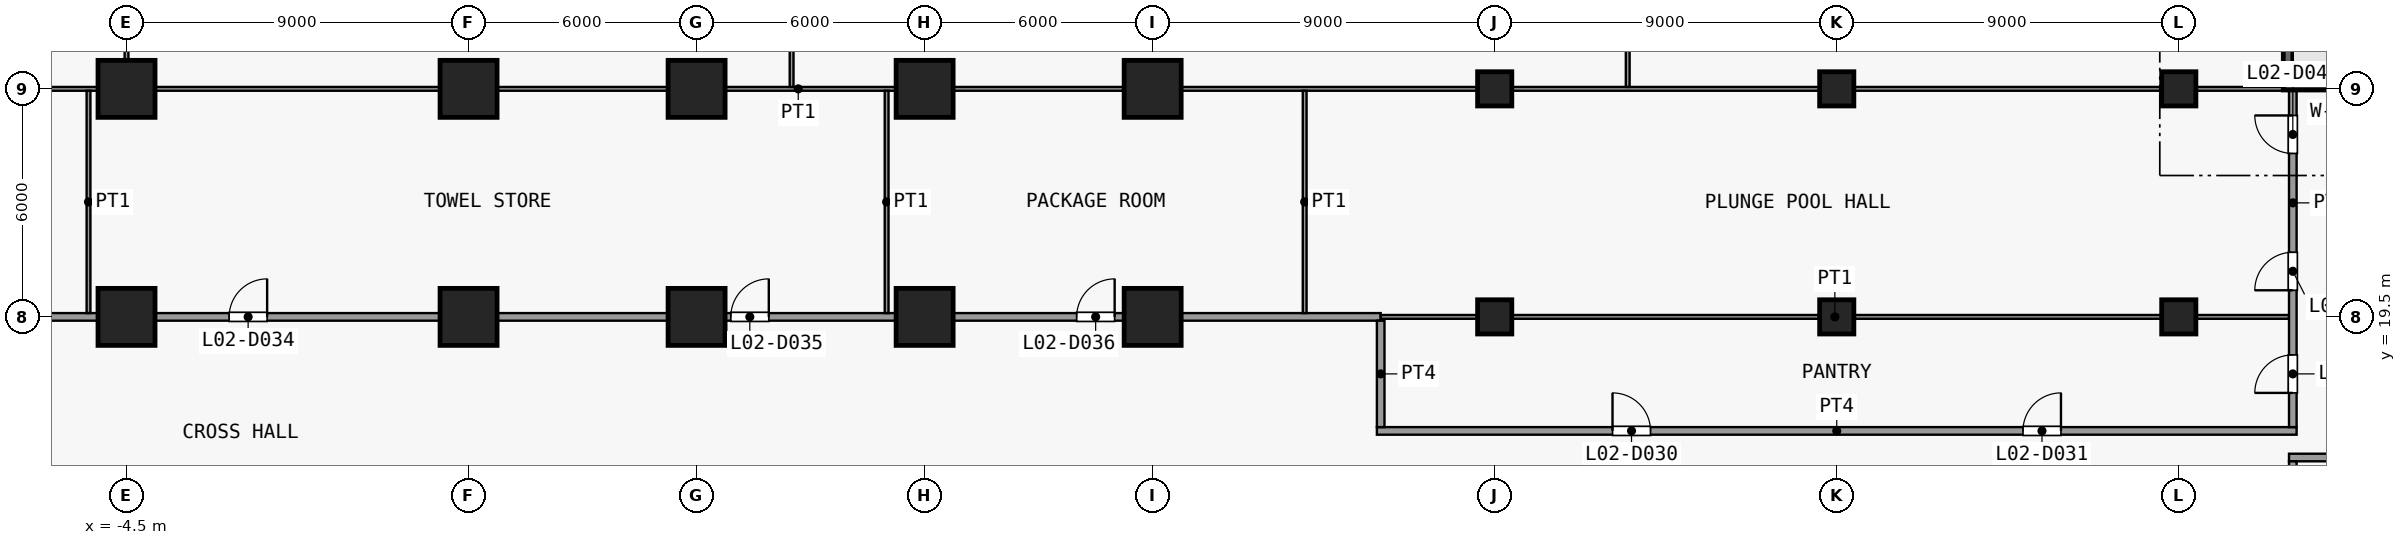
"""IFC4 building model, lengths in metres.
Left out: names, types, materials, properties, quantities, classifications, styles, units other than length and angle.
Written with IfcOpenShell. Run it as: python <this file> out.ifc"""

import sys

from ifc_helpers import new_model, si_unit, direction, frame, frame_2d, origin, origin_2d, place, context, subcontext, project, spatial, rectangle, extrude, element, fill, save


model = new_model("IFC4")
c1 = context("Model", 3, precision=1e-05, world=origin(), true_north=direction((0.0, 1.0)))
c2 = subcontext(c1, "Body", "Model", "MODEL_VIEW")
j1 = project(units=[si_unit("LENGTHUNIT", "METRE"), si_unit("PLANEANGLEUNIT", "RADIAN")], contexts=[c1])
p1 = place(None, origin())
s1 = spatial("IfcSite", under=j1, at=p1, CompositionType="ELEMENT")
p2 = place(p1, origin())
s2 = spatial("IfcBuilding", under=s1, at=p2, CompositionType="ELEMENT")
p3 = place(p2, frame((0.0, 0.0, 13.5)))
s3 = spatial("IfcBuildingStorey", under=s2, at=p3, CompositionType="ELEMENT", Elevation=13.5)
for number, where, z_axis, x_axis in (
    (1, (-4.5, 19.5, 0.0), (0.0, 0.0, 1.0), (1.0, 0.0, 0.0)),
    (2, (-4.5, 25.5, 0.0), (0.0, 0.0, 1.0), (1.0, 0.0, 0.0)),
    (3, (4.5, 19.5, 0.0), (0.0, 0.0, 1.0), (1.0, 0.0, 0.0)),
    (4, (4.5, 25.5, 0.0), (0.0, 0.0, 1.0), (1.0, 0.0, 0.0)),
    (5, (10.5, 19.5, 0.0), (0.0, 0.0, 1.0), (1.0, 0.0, 0.0)),
    (6, (10.5, 25.5, 0.0), (0.0, 0.0, 1.0), (1.0, 0.0, 0.0)),
    (7, (16.5, 19.5, 0.0), (0.0, 0.0, 1.0), (1.0, 0.0, 0.0)),
    (8, (16.5, 25.5, 0.0), (0.0, 0.0, 1.0), (1.0, 0.0, 0.0)),
    (9, (22.5, 19.5, 0.0), (0.0, 0.0, 1.0), (1.0, 0.0, 0.0)),
    (10, (22.5, 25.5, 0.0), (0.0, 0.0, 1.0), (1.0, 0.0, 0.0)),
):
    element("IfcColumn", number, at=place(p3, frame(where, z_axis=z_axis, x_axis=x_axis)), inside=s3, PredefinedType="COLUMN", context=c2, shape_type="SweptSolid", body=[
        extrude(rectangle(XDim=1.5, YDim=1.5, at=origin_2d()), origin(), (0.0, 0.0, 1.0), 5.0),
    ])
for number, where, z_axis, x_axis in (
    (11, (31.5, 19.5, 0.0), (0.0, 0.0, 1.0), (1.0, 0.0, 0.0)),
    (12, (31.5, 25.5, 0.0), (0.0, 0.0, 1.0), (1.0, 0.0, 0.0)),
    (13, (40.5, 19.5, 0.0), (0.0, 0.0, 1.0), (1.0, 0.0, 0.0)),
    (14, (40.5, 25.5, 0.0), (0.0, 0.0, 1.0), (1.0, 0.0, 0.0)),
    (15, (49.5, 19.5, 0.0), (0.0, 0.0, 1.0), (1.0, 0.0, 0.0)),
    (16, (49.5, 25.5, 0.0), (0.0, 0.0, 1.0), (1.0, 0.0, 0.0)),
):
    element("IfcColumn", number, at=place(p3, frame(where, z_axis=z_axis, x_axis=x_axis)), inside=s3, PredefinedType="COLUMN", context=c2, shape_type="SweptSolid", body=[
        extrude(rectangle(XDim=0.9, YDim=0.9, at=origin_2d()), origin(), (0.0, 0.0, 1.0), 5.0),
    ])
p4 = place(p3, frame((52.375, 25.72, 0.0), z_axis=(0.0, 0.0, 1.0), x_axis=(0.0, 1.0, 0.0)))
e17 = element("IfcWall", 17, at=p4, inside=s3, PredefinedType="SHEAR", context=c2, shape_type="SweptSolid", body=[
    extrude(rectangle(XDim=1.35, YDim=0.25, at=frame_2d((0.675, 0.0))), origin(), (0.0, 0.0, 1.0), 4.65),
])
p5 = place(p3, frame((52.25, 25.595, 0.0), z_axis=(0.0, 0.0, 1.0), x_axis=(1.0, 0.0, 0.0)))
e18 = element("IfcWall", 18, at=p5, inside=s3, PredefinedType="SHEAR", context=c2, shape_type="SweptSolid", body=[
    extrude(rectangle(XDim=3.35, YDim=0.25, at=frame_2d((1.675, 0.0))), origin(), (0.0, 0.0, 1.0), 4.65),
])
p6 = place(p3, frame((52.4, 15.8, 0.0), z_axis=(0.0, 0.0, 1.0), x_axis=(1.0, 0.0, 0.0)))
e19 = element("IfcWall", 19, at=p6, inside=s3, PredefinedType="PARTITIONING", context=c2, shape_type="SweptSolid", body=[
    extrude(rectangle(XDim=6.2, YDim=0.2, at=frame_2d((3.1, 0.0))), origin(), (0.0, 0.0, 1.0), 4.65),
])
p7 = place(p3, frame((28.4, 16.5, 0.0), z_axis=(0.0, 0.0, 1.0), x_axis=(1.0, 0.0, 0.0)))
e20 = element("IfcWall", 20, at=p7, inside=s3, PredefinedType="PARTITIONING", context=c2, shape_type="SweptSolid", body=[
    extrude(rectangle(XDim=24.2, YDim=0.2, at=frame_2d((12.1, 0.0))), origin(), (0.0, 0.0, 1.0), 4.65),
])
p8 = place(p7, frame((6.2, 0.0, 0.0)))
e21 = element("IfcOpeningElement", 21, at=p8, cuts=e20, PredefinedType="OPENING", context=c2, shape_type="SweptSolid", body=[
    extrude(rectangle(XDim=1.0, YDim=2.1, at=frame_2d((0.5, 1.05))), frame((0.0, 0.11, 0.0), z_axis=(0.0, -1.0, 0.0), x_axis=(1.0, 0.0, 0.0)), (0.0, 0.0, 1.0), 0.22),
])
p9 = place(p7, frame((17.0, 0.0, 0.0)))
e22 = element("IfcOpeningElement", 22, at=p9, cuts=e20, PredefinedType="OPENING", context=c2, shape_type="SweptSolid", body=[
    extrude(rectangle(XDim=1.0, YDim=2.1, at=frame_2d((0.5, 1.05))), frame((0.0, 0.11, 0.0), z_axis=(0.0, -1.0, 0.0), x_axis=(1.0, 0.0, 0.0)), (0.0, 0.0, 1.0), 0.22),
])
p10 = place(p3, frame((-31.6, 19.5, 0.0), z_axis=(0.0, 0.0, 1.0), x_axis=(1.0, 0.0, 0.0)))
e23 = element("IfcWall", 23, at=p10, inside=s3, PredefinedType="PARTITIONING", context=c2, shape_type="SweptSolid", body=[
    extrude(rectangle(XDim=60.1, YDim=0.2, at=frame_2d((30.05, 0.0))), origin(), (0.0, 0.0, 1.0), 4.65),
])
p11 = place(p10, frame((4.8, 0.0, 0.0)))
e24 = element("IfcOpeningElement", 24, at=p11, cuts=e23, PredefinedType="OPENING", context=c2, shape_type="SweptSolid", body=[
    extrude(rectangle(XDim=1.0, YDim=2.1, at=frame_2d((0.5, 1.05))), frame((0.0, 0.11, 0.0), z_axis=(0.0, -1.0, 0.0), x_axis=(1.0, 0.0, 0.0)), (0.0, 0.0, 1.0), 0.22),
])
p12 = place(p10, frame((19.2, 0.0, 0.0)))
e25 = element("IfcOpeningElement", 25, at=p12, cuts=e23, PredefinedType="OPENING", context=c2, shape_type="SweptSolid", body=[
    extrude(rectangle(XDim=1.0, YDim=2.1, at=frame_2d((0.5, 1.05))), frame((0.0, 0.11, 0.0), z_axis=(0.0, -1.0, 0.0), x_axis=(1.0, 0.0, 0.0)), (0.0, 0.0, 1.0), 0.22),
])
p13 = place(p10, frame((29.8, 0.0, 0.0)))
e26 = element("IfcOpeningElement", 26, at=p13, cuts=e23, PredefinedType="OPENING", context=c2, shape_type="SweptSolid", body=[
    extrude(rectangle(XDim=1.0, YDim=2.1, at=frame_2d((0.5, 1.05))), frame((0.0, 0.11, 0.0), z_axis=(0.0, -1.0, 0.0), x_axis=(1.0, 0.0, 0.0)), (0.0, 0.0, 1.0), 0.22),
])
p14 = place(p10, frame((43.0, 0.0, 0.0)))
e27 = element("IfcOpeningElement", 27, at=p14, cuts=e23, PredefinedType="OPENING", context=c2, shape_type="SweptSolid", body=[
    extrude(rectangle(XDim=1.0, YDim=2.1, at=frame_2d((0.5, 1.05))), frame((0.0, 0.11, 0.0), z_axis=(0.0, -1.0, 0.0), x_axis=(1.0, 0.0, 0.0)), (0.0, 0.0, 1.0), 0.22),
])
p15 = place(p10, frame((52.1, 0.0, 0.0)))
e28 = element("IfcOpeningElement", 28, at=p15, cuts=e23, PredefinedType="OPENING", context=c2, shape_type="SweptSolid", body=[
    extrude(rectangle(XDim=1.0, YDim=2.1, at=frame_2d((0.5, 1.05))), frame((0.0, 0.11, 0.0), z_axis=(0.0, -1.0, 0.0), x_axis=(1.0, 0.0, 0.0)), (0.0, 0.0, 1.0), 0.22),
])
p16 = place(p3, frame((28.5, 19.5, 0.0), z_axis=(0.0, 0.0, 1.0), x_axis=(1.0, 0.0, 0.0)))
e29 = element("IfcWall", 29, at=p16, inside=s3, PredefinedType="PARTITIONING", context=c2, shape_type="SweptSolid", body=[
    extrude(rectangle(XDim=23.9, YDim=0.1, at=frame_2d((11.95, 0.0))), origin(), (0.0, 0.0, 1.0), 4.65),
])
p17 = place(p3, frame((-25.9, 25.5, 0.0), z_axis=(0.0, 0.0, 1.0), x_axis=(1.0, 0.0, 0.0)))
e30 = element("IfcWall", 30, at=p17, inside=s3, PredefinedType="PARTITIONING", context=c2, shape_type="SweptSolid", body=[
    extrude(rectangle(XDim=78.15, YDim=0.1, at=frame_2d((39.075, 0.0))), origin(), (0.0, 0.0, 1.0), 4.65),
])
for number, where, z_axis, x_axis in (
    (31, (-5.5, 19.6, 0.0), (0.0, 0.0, 1.0), (0.0, 1.0, 0.0)),
    (32, (-4.5, 25.55, 0.0), (0.0, 0.0, 1.0), (0.0, 1.0, 0.0)),
    (33, (13.0, 25.55, 0.0), (0.0, 0.0, 1.0), (0.0, 1.0, 0.0)),
    (34, (15.5, 19.6, 0.0), (0.0, 0.0, 1.0), (0.0, 1.0, 0.0)),
    (35, (26.5, 19.6, 0.0), (0.0, 0.0, 1.0), (0.0, 1.0, 0.0)),
):
    element("IfcWall", number, at=place(p3, frame(where, z_axis=z_axis, x_axis=x_axis)), inside=s3, PredefinedType="PARTITIONING", context=c2, shape_type="SweptSolid", body=[
        extrude(rectangle(XDim=5.85, YDim=0.1, at=frame_2d((2.925, 0.0))), origin(), (0.0, 0.0, 1.0), 4.65),
    ])
p18 = place(p3, frame((28.5, 16.6, 0.0), z_axis=(0.0, 0.0, 1.0), x_axis=(0.0, 1.0, 0.0)))
e36 = element("IfcWall", 36, at=p18, inside=s3, PredefinedType="PARTITIONING", context=c2, shape_type="SweptSolid", body=[
    extrude(rectangle(XDim=2.8, YDim=0.2, at=frame_2d((1.4, 0.0))), origin(), (0.0, 0.0, 1.0), 4.65),
])
p19 = place(p3, frame((35.0, 25.55, 0.0), z_axis=(0.0, 0.0, 1.0), x_axis=(0.0, 1.0, 0.0)))
e37 = element("IfcWall", 37, at=p19, inside=s3, PredefinedType="PARTITIONING", context=c2, shape_type="SweptSolid", body=[
    extrude(rectangle(XDim=5.85, YDim=0.1, at=frame_2d((2.925, 0.0))), origin(), (0.0, 0.0, 1.0), 4.65),
])
p20 = place(p3, frame((52.5, -16.5, 0.0), z_axis=(0.0, 0.0, 1.0), x_axis=(0.0, 1.0, 0.0)))
e38 = element("IfcWall", 38, at=p20, inside=s3, PredefinedType="PARTITIONING", context=c2, shape_type="SweptSolid", body=[
    extrude(rectangle(XDim=32.2, YDim=0.2, at=frame_2d((16.1, 0.0))), origin(), (0.0, 0.0, 1.0), 4.65),
])
p21 = place(p3, frame((52.5, 16.6, 0.0), z_axis=(0.0, 0.0, 1.0), x_axis=(0.0, 1.0, 0.0)))
e39 = element("IfcWall", 39, at=p21, inside=s3, PredefinedType="PARTITIONING", context=c2, shape_type="SweptSolid", body=[
    extrude(rectangle(XDim=8.87, YDim=0.2, at=frame_2d((4.435, 0.0))), origin(), (0.0, 0.0, 1.0), 4.65),
])
p22 = place(p21, frame((0.9, 0.0, 0.0)))
e40 = element("IfcOpeningElement", 40, at=p22, cuts=e39, PredefinedType="OPENING", context=c2, shape_type="SweptSolid", body=[
    extrude(rectangle(XDim=1.0, YDim=2.1, at=frame_2d((0.5, 1.05))), frame((0.0, 0.11, 0.0), z_axis=(0.0, -1.0, 0.0), x_axis=(1.0, 0.0, 0.0)), (0.0, 0.0, 1.0), 0.22),
])
p23 = place(p21, frame((3.6, 0.0, 0.0)))
e41 = element("IfcOpeningElement", 41, at=p23, cuts=e39, PredefinedType="OPENING", context=c2, shape_type="SweptSolid", body=[
    extrude(rectangle(XDim=1.0, YDim=2.1, at=frame_2d((0.5, 1.05))), frame((0.0, 0.11, 0.0), z_axis=(0.0, -1.0, 0.0), x_axis=(1.0, 0.0, 0.0)), (0.0, 0.0, 1.0), 0.22),
])
p24 = place(p21, frame((7.2, 0.0, 0.0)))
e42 = element("IfcOpeningElement", 42, at=p24, cuts=e39, PredefinedType="OPENING", context=c2, shape_type="SweptSolid", body=[
    extrude(rectangle(XDim=1.0, YDim=2.1, at=frame_2d((0.5, 1.05))), frame((0.0, 0.11, 0.0), z_axis=(0.0, -1.0, 0.0), x_axis=(1.0, 0.0, 0.0)), (0.0, 0.0, 1.0), 0.22),
])
p25 = place(p8, origin())
e43 = element("IfcDoor", 43, at=p25, inside=s3, OperationType="SINGLE_SWING_RIGHT", PredefinedType="DOOR", context=c2, shape_type="SweptSolid", body=[
    extrude(rectangle(XDim=1.0, YDim=2.1, at=frame_2d((0.5, 1.05))), frame((0.0, 0.025, 0.0), z_axis=(0.0, -1.0, 0.0), x_axis=(1.0, 0.0, 0.0)), (0.0, 0.0, 1.0), 0.05),
])
fill(e21, e43)
p26 = place(p9, origin())
e44 = element("IfcDoor", 44, at=p26, inside=s3, OperationType="SINGLE_SWING_LEFT", PredefinedType="DOOR", context=c2, shape_type="SweptSolid", body=[
    extrude(rectangle(XDim=1.0, YDim=2.1, at=frame_2d((0.5, 1.05))), frame((0.0, 0.025, 0.0), z_axis=(0.0, -1.0, 0.0), x_axis=(1.0, 0.0, 0.0)), (0.0, 0.0, 1.0), 0.05),
])
fill(e22, e44)
p27 = place(p13, origin())
e45 = element("IfcDoor", 45, at=p27, inside=s3, OperationType="SINGLE_SWING_LEFT", PredefinedType="DOOR", context=c2, shape_type="SweptSolid", body=[
    extrude(rectangle(XDim=1.0, YDim=2.1, at=frame_2d((0.5, 1.05))), frame((0.0, 0.025, 0.0), z_axis=(0.0, -1.0, 0.0), x_axis=(1.0, 0.0, 0.0)), (0.0, 0.0, 1.0), 0.05),
])
fill(e26, e45)
p28 = place(p14, origin())
e46 = element("IfcDoor", 46, at=p28, inside=s3, OperationType="SINGLE_SWING_LEFT", PredefinedType="DOOR", context=c2, shape_type="SweptSolid", body=[
    extrude(rectangle(XDim=1.0, YDim=2.1, at=frame_2d((0.5, 1.05))), frame((0.0, 0.025, 0.0), z_axis=(0.0, -1.0, 0.0), x_axis=(1.0, 0.0, 0.0)), (0.0, 0.0, 1.0), 0.05),
])
fill(e27, e46)
p29 = place(p15, origin())
e47 = element("IfcDoor", 47, at=p29, inside=s3, OperationType="SINGLE_SWING_LEFT", PredefinedType="DOOR", context=c2, shape_type="SweptSolid", body=[
    extrude(rectangle(XDim=1.0, YDim=2.1, at=frame_2d((0.5, 1.05))), frame((0.0, 0.025, 0.0), z_axis=(0.0, -1.0, 0.0), x_axis=(1.0, 0.0, 0.0)), (0.0, 0.0, 1.0), 0.05),
])
fill(e28, e47)
p30 = place(p22, origin())
e48 = element("IfcDoor", 48, at=p30, inside=s3, OperationType="SINGLE_SWING_RIGHT", PredefinedType="DOOR", context=c2, shape_type="SweptSolid", body=[
    extrude(rectangle(XDim=1.0, YDim=2.1, at=frame_2d((0.5, 1.05))), frame((0.0, 0.025, 0.0), z_axis=(0.0, -1.0, 0.0), x_axis=(1.0, 0.0, 0.0)), (0.0, 0.0, 1.0), 0.05),
])
fill(e40, e48)
p31 = place(p23, origin())
e49 = element("IfcDoor", 49, at=p31, inside=s3, OperationType="SINGLE_SWING_RIGHT", PredefinedType="DOOR", context=c2, shape_type="SweptSolid", body=[
    extrude(rectangle(XDim=1.0, YDim=2.1, at=frame_2d((0.5, 1.05))), frame((0.0, 0.025, 0.0), z_axis=(0.0, -1.0, 0.0), x_axis=(1.0, 0.0, 0.0)), (0.0, 0.0, 1.0), 0.05),
])
fill(e41, e49)
p32 = place(p24, origin())
e50 = element("IfcDoor", 50, at=p32, inside=s3, OperationType="SINGLE_SWING_LEFT", PredefinedType="DOOR", context=c2, shape_type="SweptSolid", body=[
    extrude(rectangle(XDim=1.0, YDim=2.1, at=frame_2d((0.5, 1.05))), frame((0.0, 0.025, 0.0), z_axis=(0.0, -1.0, 0.0), x_axis=(1.0, 0.0, 0.0)), (0.0, 0.0, 1.0), 0.05),
])
fill(e42, e50)
save(model, sys.argv[1])
